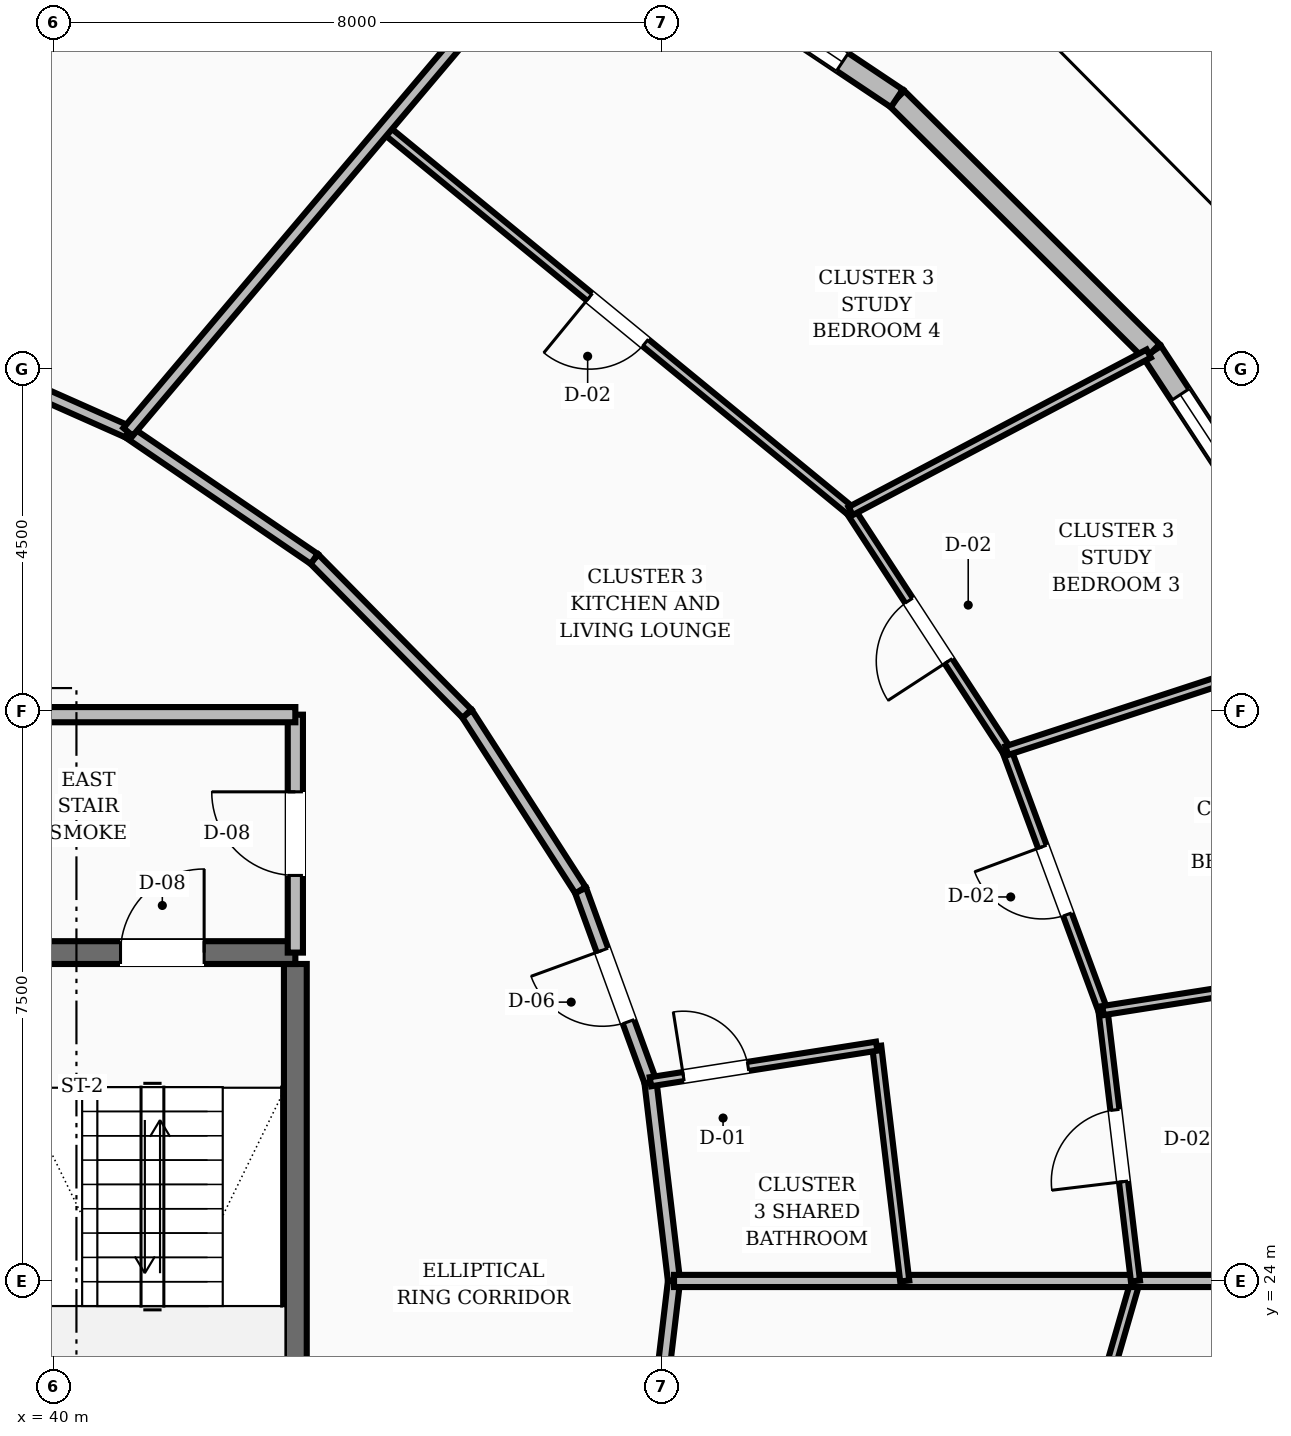
"""IFC4 building model, lengths in metres.
Left out: names, types, materials, properties, quantities, classifications, styles, units other than length and angle.
Written with IfcOpenShell. Run it as: python <this file> out.ifc"""

import sys

from ifc_helpers import new_model, si_unit, direction, frame, frame_2d, origin, place, context, subcontext, project, spatial, rectangle, extrude, element, fill, save


model = new_model("IFC4")
c1 = context("Model", 3, precision=1e-05, world=origin(), true_north=direction((0.0, 1.0)))
c2 = subcontext(c1, "Body", "Model", "MODEL_VIEW")
j1 = project(units=[si_unit("LENGTHUNIT", "METRE"), si_unit("PLANEANGLEUNIT", "RADIAN")], contexts=[c1])
p1 = place(None, origin())
s1 = spatial("IfcSite", under=j1, at=p1, CompositionType="ELEMENT")
p2 = place(p1, origin())
s2 = spatial("IfcBuilding", under=s1, at=p2, CompositionType="ELEMENT")
p3 = place(p2, frame((0.0, 0.0, 73.6)))
s3 = spatial("IfcBuildingStorey", under=s2, at=p3, CompositionType="ELEMENT", Elevation=73.6)
p4 = place(p3, frame((43.18, 19.43, 0.0), z_axis=(0.0, 0.0, 1.0), x_axis=(0.0, 1.0, 0.0)))
e1 = element("IfcWall", 1, at=p4, inside=s3, PredefinedType="SHEAR", context=c2, shape_type="SweptSolid", body=[
    extrude(rectangle(XDim=8.74, YDim=0.3, at=frame_2d((4.37, 0.0))), origin(), (0.0, 0.0, 1.0), 3.6),
])
p5 = place(p3, frame((39.58, 28.32, 0.0), z_axis=(0.0, 0.0, 1.0), x_axis=(1.0, 0.0, 0.0)))
e2 = element("IfcWall", 2, at=p5, inside=s3, PredefinedType="SHEAR", context=c2, shape_type="SweptSolid", body=[
    extrude(rectangle(XDim=3.6, YDim=0.3, at=frame_2d((1.8, 0.0))), origin(), (0.0, 0.0, 1.0), 3.6),
])
p6 = place(p5, frame((1.3, 0.0, 0.0)))
e3 = element("IfcOpeningElement", 3, at=p6, cuts=e2, PredefinedType="OPENING", context=c2, shape_type="SweptSolid", body=[
    extrude(rectangle(XDim=1.1, YDim=2.1, at=frame_2d((0.55, 1.05))), frame((0.0, 0.16, 0.0), z_axis=(0.0, -1.0, 0.0), x_axis=(1.0, 0.0, 0.0)), (0.0, 0.0, 1.0), 0.32),
])
p7 = place(p3, frame((56.947, 32.42, 0.0), z_axis=(0.0, 0.0, 1.0), x_axis=(-0.548505219405, 0.836147130765, 0.0)))
e4 = element("IfcWall", 4, at=p7, inside=s3, PredefinedType="STANDARD", context=c2, shape_type="SweptSolid", body=[
    extrude(rectangle(XDim=4.549, YDim=0.28, at=frame_2d((2.275, 0.0))), origin(), (0.0, 0.0, 1.0), 2.71),
])
p8 = place(p7, frame((0.675, 0.0, 0.8)))
e5 = element("IfcOpeningElement", 5, at=p8, cuts=e4, PredefinedType="OPENING", context=c2, shape_type="SweptSolid", body=[
    extrude(rectangle(XDim=3.2, YDim=1.65, at=frame_2d((1.6, 0.825))), frame((0.0, 0.15, 0.0), z_axis=(0.0, -1.0, 0.0), x_axis=(1.0, 0.0, 0.0)), (0.0, 0.0, 1.0), 0.3),
])
p9 = place(p3, frame((54.452, 36.224, 0.0), z_axis=(0.0, 0.0, 1.0), x_axis=(-0.709630207161, 0.704574317645, 0.0)))
e6 = element("IfcWall", 6, at=p9, inside=s3, PredefinedType="STANDARD", context=c2, shape_type="SweptSolid", body=[
    extrude(rectangle(XDim=4.732, YDim=0.28, at=frame_2d((2.366, 0.0))), origin(), (0.0, 0.0, 1.0), 2.71),
])
p10 = place(p3, frame((51.094, 39.558, 0.0), z_axis=(0.0, 0.0, 1.0), x_axis=(-0.831278799502, 0.55585569845, 0.0)))
e7 = element("IfcWall", 7, at=p10, inside=s3, PredefinedType="STANDARD", context=c2, shape_type="SweptSolid", body=[
    extrude(rectangle(XDim=4.922, YDim=0.28, at=frame_2d((2.461, 0.0))), origin(), (0.0, 0.0, 1.0), 2.71),
])
p11 = place(p10, frame((0.861, 0.0, 0.8)))
e8 = element("IfcOpeningElement", 8, at=p11, cuts=e7, PredefinedType="OPENING", context=c2, shape_type="SweptSolid", body=[
    extrude(rectangle(XDim=3.2, YDim=1.65, at=frame_2d((1.6, 0.825))), frame((0.0, 0.15, 0.0), z_axis=(0.0, -1.0, 0.0), x_axis=(1.0, 0.0, 0.0)), (0.0, 0.0, 1.0), 0.3),
])
p12 = place(p3, frame((43.18, 28.32, 0.0), z_axis=(0.0, 0.0, 1.0), x_axis=(0.0, 1.0, 0.0)))
e9 = element("IfcWall", 9, at=p12, inside=s3, PredefinedType="SOLIDWALL", context=c2, shape_type="SweptSolid", body=[
    extrude(rectangle(XDim=3.13, YDim=0.2, at=frame_2d((1.565, 0.0))), origin(), (0.0, 0.0, 1.0), 2.71),
])
p13 = place(p12, frame((1.015, 0.0, 0.0)))
e10 = element("IfcOpeningElement", 10, at=p13, cuts=e9, PredefinedType="OPENING", context=c2, shape_type="SweptSolid", body=[
    extrude(rectangle(XDim=1.1, YDim=2.1, at=frame_2d((0.55, 1.05))), frame((0.0, 0.11, 0.0), z_axis=(0.0, -1.0, 0.0), x_axis=(1.0, 0.0, 0.0)), (0.0, 0.0, 1.0), 0.22),
])
p14 = place(p3, frame((39.2, 31.45, 0.0), z_axis=(0.0, 0.0, 1.0), x_axis=(1.0, 0.0, 0.0)))
e11 = element("IfcWall", 11, at=p14, inside=s3, PredefinedType="SOLIDWALL", context=c2, shape_type="SweptSolid", body=[
    extrude(rectangle(XDim=3.98, YDim=0.2, at=frame_2d((1.99, 0.0))), origin(), (0.0, 0.0, 1.0), 2.71),
])
p15 = place(p3, frame((48.162, 24.0, 0.0), z_axis=(0.0, 0.0, 1.0), x_axis=(-0.117667763342, 0.993053018459, 0.0)))
e12 = element("IfcWall", 12, at=p15, inside=s3, PredefinedType="SOLIDWALL", context=c2, shape_type="SweptSolid", body=[
    extrude(rectangle(XDim=2.639, YDim=0.16, at=frame_2d((1.32, 0.0))), origin(), (0.0, 0.0, 1.0), 2.71),
])
p16 = place(p3, frame((47.852, 26.621, 0.0), z_axis=(0.0, 0.0, 1.0), x_axis=(-0.342882618672, 0.939378257047, 0.0)))
e13 = element("IfcWall", 13, at=p16, inside=s3, PredefinedType="SOLIDWALL", context=c2, shape_type="SweptSolid", body=[
    extrude(rectangle(XDim=2.683, YDim=0.16, at=frame_2d((1.341, 0.0))), origin(), (0.0, 0.0, 1.0), 2.71),
])
p17 = place(p16, frame((0.841, 0.0, 0.0)))
e14 = element("IfcOpeningElement", 14, at=p17, cuts=e13, PredefinedType="OPENING", context=c2, shape_type="SweptSolid", body=[
    extrude(rectangle(XDim=1.0, YDim=2.1, at=frame_2d((0.5, 1.05))), frame((0.0, 0.09, 0.0), z_axis=(0.0, -1.0, 0.0), x_axis=(1.0, 0.0, 0.0)), (0.0, 0.0, 1.0), 0.18),
])
p18 = place(p3, frame((46.932, 29.141, 0.0), z_axis=(0.0, 0.0, 1.0), x_axis=(-0.540891657444, 0.841092274907, 0.0)))
e15 = element("IfcWall", 15, at=p18, inside=s3, PredefinedType="SOLIDWALL", context=c2, shape_type="SweptSolid", body=[
    extrude(rectangle(XDim=2.761, YDim=0.16, at=frame_2d((1.38, 0.0))), origin(), (0.0, 0.0, 1.0), 2.71),
])
p19 = place(p3, frame((45.438, 31.463, 0.0), z_axis=(0.0, 0.0, 1.0), x_axis=(-0.702569520063, 0.711615113301, 0.0)))
e16 = element("IfcWall", 16, at=p19, inside=s3, PredefinedType="SOLIDWALL", context=c2, shape_type="SweptSolid", body=[
    extrude(rectangle(XDim=2.861, YDim=0.16, at=frame_2d((1.43, 0.0))), origin(), (0.0, 0.0, 1.0), 2.71),
])
p20 = place(p3, frame((43.428, 33.499, 0.0), z_axis=(0.0, 0.0, 1.0), x_axis=(-0.826112340767, 0.563505457323, 0.0)))
e17 = element("IfcWall", 17, at=p20, inside=s3, PredefinedType="SOLIDWALL", context=c2, shape_type="SweptSolid", body=[
    extrude(rectangle(XDim=2.965, YDim=0.16, at=frame_2d((1.482, 0.0))), origin(), (0.0, 0.0, 1.0), 2.71),
])
p21 = place(p3, frame((40.979, 35.17, 0.0), z_axis=(0.0, 0.0, 1.0), x_axis=(-0.913860932409, 0.406027334321, 0.0)))
e18 = element("IfcWall", 18, at=p21, inside=s3, PredefinedType="SOLIDWALL", context=c2, shape_type="SweptSolid", body=[
    extrude(rectangle(XDim=3.058, YDim=0.16, at=frame_2d((1.529, 0.0))), origin(), (0.0, 0.0, 1.0), 2.71),
])
p22 = place(p3, frame((47.852, 21.379, 0.0), z_axis=(0.0, 0.0, 1.0), x_axis=(0.117667763342, 0.993053018459, 0.0)))
e19 = element("IfcWall", 19, at=p22, inside=s3, PredefinedType="SOLIDWALL", context=c2, shape_type="SweptSolid", body=[
    extrude(rectangle(XDim=2.639, YDim=0.16, at=frame_2d((1.32, 0.0))), origin(), (0.0, 0.0, 1.0), 2.71),
])
p23 = place(p3, frame((52.25, 17.143, 0.0), z_axis=(0.0, 0.0, 1.0), x_axis=(0.277696791091, 0.960668773417, 0.0)))
e20 = element("IfcWall", 20, at=p23, inside=s3, PredefinedType="PARTITIONING", context=c2, shape_type="SweptSolid", body=[
    extrude(rectangle(XDim=7.138, YDim=0.12, at=frame_2d((3.569, 0.0))), origin(), (0.0, 0.0, 1.0), 2.71),
])
p24 = place(p23, frame((3.094, 0.0, 0.0)))
e21 = element("IfcOpeningElement", 21, at=p24, cuts=e20, PredefinedType="OPENING", context=c2, shape_type="SweptSolid", body=[
    extrude(rectangle(XDim=0.95, YDim=2.1, at=frame_2d((0.475, 1.05))), frame((0.0, 0.07, 0.0), z_axis=(0.0, -1.0, 0.0), x_axis=(1.0, 0.0, 0.0)), (0.0, 0.0, 1.0), 0.14),
])
p25 = place(p3, frame((48.162, 24.0, 0.0), z_axis=(0.0, 0.0, 1.0), x_axis=(1.0, 0.0, 0.0)))
e22 = element("IfcWall", 22, at=p25, inside=s3, PredefinedType="SOLIDWALL", context=c2, shape_type="SweptSolid", body=[
    extrude(rectangle(XDim=10.79, YDim=0.16, at=frame_2d((5.395, 0.0))), origin(), (0.0, 0.0, 1.0), 2.71),
])
p26 = place(p3, frame((51.197, 24.0, 0.0), z_axis=(0.0, 0.0, 1.0), x_axis=(-0.118507685269, 0.992953135114, 0.0)))
e23 = element("IfcWall", 23, at=p26, inside=s3, PredefinedType="PARTITIONING", context=c2, shape_type="SweptSolid", body=[
    extrude(rectangle(XDim=3.111, YDim=0.12, at=frame_2d((1.555, 0.0))), origin(), (0.0, 0.0, 1.0), 2.71),
])
p27 = place(p3, frame((47.852, 26.621, 0.0), z_axis=(0.0, 0.0, 1.0), x_axis=(0.987867184376, 0.15530108188, 0.0)))
e24 = element("IfcWall", 24, at=p27, inside=s3, PredefinedType="PARTITIONING", context=c2, shape_type="SweptSolid", body=[
    extrude(rectangle(XDim=3.014, YDim=0.12, at=frame_2d((1.507, 0.0))), origin(), (0.0, 0.0, 1.0), 2.71),
])
p28 = place(p27, frame((0.44, 0.0, 0.0)))
e25 = element("IfcOpeningElement", 25, at=p28, cuts=e24, PredefinedType="OPENING", context=c2, shape_type="SweptSolid", body=[
    extrude(rectangle(XDim=0.86, YDim=2.1, at=frame_2d((0.43, 1.05))), frame((0.0, 0.07, 0.0), z_axis=(0.0, -1.0, 0.0), x_axis=(1.0, 0.0, 0.0)), (0.0, 0.0, 1.0), 0.14),
])
p29 = place(p3, frame((54.233, 24.0, 0.0), z_axis=(0.0, 0.0, 1.0), x_axis=(-0.11926077216, 0.992862965481, 0.0)))
e26 = element("IfcWall", 26, at=p29, inside=s3, PredefinedType="PARTITIONING", context=c2, shape_type="SweptSolid", body=[
    extrude(rectangle(XDim=3.583, YDim=0.12, at=frame_2d((1.791, 0.0))), origin(), (0.0, 0.0, 1.0), 2.71),
])
p30 = place(p29, frame((1.316, 0.0, 0.0)))
e27 = element("IfcOpeningElement", 27, at=p30, cuts=e26, PredefinedType="OPENING", context=c2, shape_type="SweptSolid", body=[
    extrude(rectangle(XDim=0.95, YDim=2.1, at=frame_2d((0.475, 1.05))), frame((0.0, 0.07, 0.0), z_axis=(0.0, -1.0, 0.0), x_axis=(1.0, 0.0, 0.0)), (0.0, 0.0, 1.0), 0.14),
])
p31 = place(p3, frame((53.805, 27.557, 0.0), z_axis=(0.0, 0.0, 1.0), x_axis=(-0.346908777405, 0.937898875231, 0.0)))
e28 = element("IfcWall", 28, at=p31, inside=s3, PredefinedType="PARTITIONING", context=c2, shape_type="SweptSolid", body=[
    extrude(rectangle(XDim=3.647, YDim=0.12, at=frame_2d((1.823, 0.0))), origin(), (0.0, 0.0, 1.0), 2.71),
])
p32 = place(p31, frame((1.348, 0.0, 0.0)))
e29 = element("IfcOpeningElement", 29, at=p32, cuts=e28, PredefinedType="OPENING", context=c2, shape_type="SweptSolid", body=[
    extrude(rectangle(XDim=0.95, YDim=2.1, at=frame_2d((0.475, 1.05))), frame((0.0, 0.07, 0.0), z_axis=(0.0, -1.0, 0.0), x_axis=(1.0, 0.0, 0.0)), (0.0, 0.0, 1.0), 0.14),
])
p33 = place(p3, frame((53.805, 27.557, 0.0), z_axis=(0.0, 0.0, 1.0), x_axis=(0.98786330909, 0.155325730492, 0.0)))
e30 = element("IfcWall", 30, at=p33, inside=s3, PredefinedType="PARTITIONING", context=c2, shape_type="SweptSolid", body=[
    extrude(rectangle(XDim=4.686, YDim=0.12, at=frame_2d((2.343, 0.0))), origin(), (0.0, 0.0, 1.0), 2.71),
])
p34 = place(p3, frame((52.54, 30.977, 0.0), z_axis=(0.0, 0.0, 1.0), x_axis=(-0.546030238515, 0.837765467555, 0.0)))
e31 = element("IfcWall", 31, at=p34, inside=s3, PredefinedType="PARTITIONING", context=c2, shape_type="SweptSolid", body=[
    extrude(rectangle(XDim=3.762, YDim=0.12, at=frame_2d((1.881, 0.0))), origin(), (0.0, 0.0, 1.0), 2.71),
])
p35 = place(p34, frame((1.406, 0.0, 0.0)))
e32 = element("IfcOpeningElement", 32, at=p35, cuts=e31, PredefinedType="OPENING", context=c2, shape_type="SweptSolid", body=[
    extrude(rectangle(XDim=0.95, YDim=2.1, at=frame_2d((0.475, 1.05))), frame((0.0, 0.07, 0.0), z_axis=(0.0, -1.0, 0.0), x_axis=(1.0, 0.0, 0.0)), (0.0, 0.0, 1.0), 0.14),
])
p36 = place(p3, frame((52.54, 30.977, 0.0), z_axis=(0.0, 0.0, 1.0), x_axis=(0.950372809116, 0.311113361483, 0.0)))
e33 = element("IfcWall", 33, at=p36, inside=s3, PredefinedType="PARTITIONING", context=c2, shape_type="SweptSolid", body=[
    extrude(rectangle(XDim=4.587, YDim=0.12, at=frame_2d((2.293, 0.0))), origin(), (0.0, 0.0, 1.0), 2.71),
])
p37 = place(p3, frame((50.486, 34.129, 0.0), z_axis=(0.0, 0.0, 1.0), x_axis=(-0.773245155234, 0.634107191181, 0.0)))
e34 = element("IfcWall", 34, at=p37, inside=s3, PredefinedType="PARTITIONING", context=c2, shape_type="SweptSolid", body=[
    extrude(rectangle(XDim=7.933, YDim=0.12, at=frame_2d((3.966, 0.0))), origin(), (0.0, 0.0, 1.0), 2.71),
])
p38 = place(p37, frame((3.491, 0.0, 0.0)))
e35 = element("IfcOpeningElement", 35, at=p38, cuts=e34, PredefinedType="OPENING", context=c2, shape_type="SweptSolid", body=[
    extrude(rectangle(XDim=0.95, YDim=2.1, at=frame_2d((0.475, 1.05))), frame((0.0, 0.07, 0.0), z_axis=(0.0, -1.0, 0.0), x_axis=(1.0, 0.0, 0.0)), (0.0, 0.0, 1.0), 0.14),
])
p39 = place(p3, frame((50.486, 34.129, 0.0), z_axis=(0.0, 0.0, 1.0), x_axis=(0.88426415874, 0.466987042184, 0.0)))
e36 = element("IfcWall", 36, at=p39, inside=s3, PredefinedType="PARTITIONING", context=c2, shape_type="SweptSolid", body=[
    extrude(rectangle(XDim=4.435, YDim=0.12, at=frame_2d((2.217, 0.0))), origin(), (0.0, 0.0, 1.0), 2.71),
])
p40 = place(p3, frame((40.979, 35.17, 0.0), z_axis=(0.0, 0.0, 1.0), x_axis=(0.645595412699, 0.763679620719, 0.0)))
e37 = element("IfcWall", 37, at=p40, inside=s3, PredefinedType="SOLIDWALL", context=c2, shape_type="SweptSolid", body=[
    extrude(rectangle(XDim=9.279, YDim=0.16, at=frame_2d((4.64, 0.0))), origin(), (0.0, 0.0, 1.0), 2.71),
])
p41 = place(p8, origin())
e38 = element("IfcWindow", 38, at=p41, inside=s3, PartitioningType="SINGLE_PANEL", PredefinedType="WINDOW", context=c2, shape_type="SweptSolid", body=[
    extrude(rectangle(XDim=3.2, YDim=1.65, at=frame_2d((1.6, 0.825))), frame((0.0, 0.03, 0.0), z_axis=(0.0, -1.0, 0.0), x_axis=(1.0, 0.0, 0.0)), (0.0, 0.0, 1.0), 0.06),
])
fill(e5, e38)
p42 = place(p11, origin())
e39 = element("IfcWindow", 39, at=p42, inside=s3, PartitioningType="SINGLE_PANEL", PredefinedType="WINDOW", context=c2, shape_type="SweptSolid", body=[
    extrude(rectangle(XDim=3.2, YDim=1.65, at=frame_2d((1.6, 0.825))), frame((0.0, 0.03, 0.0), z_axis=(0.0, -1.0, 0.0), x_axis=(1.0, 0.0, 0.0)), (0.0, 0.0, 1.0), 0.06),
])
fill(e8, e39)
p43 = place(p6, origin())
e40 = element("IfcDoor", 40, at=p43, inside=s3, OperationType="SINGLE_SWING_RIGHT", PredefinedType="DOOR", context=c2, shape_type="SweptSolid", body=[
    extrude(rectangle(XDim=1.1, YDim=2.1, at=frame_2d((0.55, 1.05))), frame((0.0, 0.025, 0.0), z_axis=(0.0, -1.0, 0.0), x_axis=(1.0, 0.0, 0.0)), (0.0, 0.0, 1.0), 0.05),
])
fill(e3, e40)
p44 = place(p13, origin())
e41 = element("IfcDoor", 41, at=p44, inside=s3, OperationType="SINGLE_SWING_RIGHT", PredefinedType="DOOR", context=c2, shape_type="SweptSolid", body=[
    extrude(rectangle(XDim=1.1, YDim=2.1, at=frame_2d((0.55, 1.05))), frame((0.0, 0.025, 0.0), z_axis=(0.0, -1.0, 0.0), x_axis=(1.0, 0.0, 0.0)), (0.0, 0.0, 1.0), 0.05),
])
fill(e10, e41)
p45 = place(p28, origin())
e42 = element("IfcDoor", 42, at=p45, inside=s3, OperationType="SINGLE_SWING_LEFT", PredefinedType="DOOR", context=c2, shape_type="SweptSolid", body=[
    extrude(rectangle(XDim=0.86, YDim=2.1, at=frame_2d((0.43, 1.05))), frame((0.0, 0.025, 0.0), z_axis=(0.0, -1.0, 0.0), x_axis=(1.0, 0.0, 0.0)), (0.0, 0.0, 1.0), 0.05),
])
fill(e25, e42)
p46 = place(p17, origin())
e43 = element("IfcDoor", 43, at=p46, inside=s3, OperationType="SINGLE_SWING_RIGHT", PredefinedType="DOOR", context=c2, shape_type="SweptSolid", body=[
    extrude(rectangle(XDim=1.0, YDim=2.1, at=frame_2d((0.5, 1.05))), frame((0.0, 0.025, 0.0), z_axis=(0.0, -1.0, 0.0), x_axis=(1.0, 0.0, 0.0)), (0.0, 0.0, 1.0), 0.05),
])
fill(e14, e43)
p47 = place(p30, origin())
e44 = element("IfcDoor", 44, at=p47, inside=s3, OperationType="SINGLE_SWING_LEFT", PredefinedType="DOOR", context=c2, shape_type="SweptSolid", body=[
    extrude(rectangle(XDim=0.95, YDim=2.1, at=frame_2d((0.475, 1.05))), frame((0.0, 0.025, 0.0), z_axis=(0.0, -1.0, 0.0), x_axis=(1.0, 0.0, 0.0)), (0.0, 0.0, 1.0), 0.05),
])
fill(e27, e44)
p48 = place(p32, origin())
e45 = element("IfcDoor", 45, at=p48, inside=s3, OperationType="SINGLE_SWING_RIGHT", PredefinedType="DOOR", context=c2, shape_type="SweptSolid", body=[
    extrude(rectangle(XDim=0.95, YDim=2.1, at=frame_2d((0.475, 1.05))), frame((0.0, 0.025, 0.0), z_axis=(0.0, -1.0, 0.0), x_axis=(1.0, 0.0, 0.0)), (0.0, 0.0, 1.0), 0.05),
])
fill(e29, e45)
p49 = place(p35, origin())
e46 = element("IfcDoor", 46, at=p49, inside=s3, OperationType="SINGLE_SWING_LEFT", PredefinedType="DOOR", context=c2, shape_type="SweptSolid", body=[
    extrude(rectangle(XDim=0.95, YDim=2.1, at=frame_2d((0.475, 1.05))), frame((0.0, 0.025, 0.0), z_axis=(0.0, -1.0, 0.0), x_axis=(1.0, 0.0, 0.0)), (0.0, 0.0, 1.0), 0.05),
])
fill(e32, e46)
p50 = place(p38, origin())
e47 = element("IfcDoor", 47, at=p50, inside=s3, OperationType="SINGLE_SWING_RIGHT", PredefinedType="DOOR", context=c2, shape_type="SweptSolid", body=[
    extrude(rectangle(XDim=0.95, YDim=2.1, at=frame_2d((0.475, 1.05))), frame((0.0, 0.025, 0.0), z_axis=(0.0, -1.0, 0.0), x_axis=(1.0, 0.0, 0.0)), (0.0, 0.0, 1.0), 0.05),
])
fill(e35, e47)
save(model, sys.argv[1])
